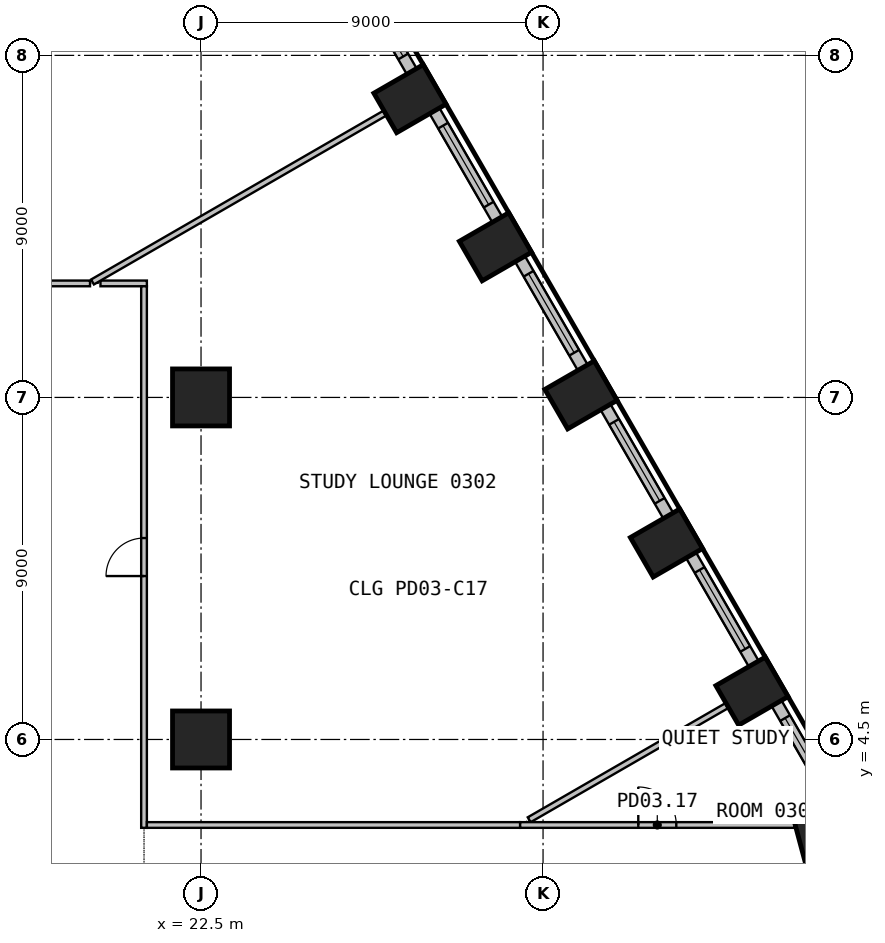
"""IFC4 building model, lengths in metres.
Left out: names, types, materials, properties, quantities, classifications, styles, units other than length and angle.
Written with IfcOpenShell. Run it as: python <this file> out.ifc"""

import sys

from ifc_helpers import new_model, si_unit, direction, frame, frame_2d, origin, origin_2d, place, context, subcontext, project, spatial, rectangle, circle, extrude, element, fill, save


model = new_model("IFC4")
c1 = context("Model", 3, precision=1e-05, world=origin(), true_north=direction((0.0, 1.0)))
c2 = subcontext(c1, "Body", "Model", "MODEL_VIEW")
j1 = project(units=[si_unit("LENGTHUNIT", "METRE"), si_unit("PLANEANGLEUNIT", "RADIAN")], contexts=[c1])
p1 = place(None, origin())
s1 = spatial("IfcSite", under=j1, at=p1, CompositionType="ELEMENT")
p2 = place(p1, origin())
s2 = spatial("IfcBuilding", under=s1, at=p2, CompositionType="ELEMENT")
p3 = place(p2, frame((0.0, 0.0, 15.6)))
s3 = spatial("IfcBuildingStorey", under=s2, at=p3, CompositionType="ELEMENT", Elevation=15.6)
p4 = place(p3, frame((38.979, 2.004, 0.0), z_axis=(0.0, 0.0, 1.0), x_axis=(-0.258819045103, 0.965925826289, 0.0)))
e1 = element("IfcColumn", 1, at=p4, inside=s3, PredefinedType="COLUMN", context=c2, shape_type="SweptSolid", body=[
    extrude(rectangle(XDim=1.5, YDim=1.5, at=origin_2d()), origin(), (0.0, 0.0, 1.0), 4.4),
])
for number, where, z_axis, x_axis in (
    (2, (36.998, 5.772, 0.0), (0.0, 0.0, 1.0), (-0.5, 0.866, 0.0)),
    (3, (34.748, 9.669, 0.0), (0.0, 0.0, 1.0), (-0.5, 0.866, 0.0)),
    (4, (32.498, 13.566, 0.0), (0.0, 0.0, 1.0), (-0.5, 0.866, 0.0)),
    (5, (30.248, 17.463, 0.0), (0.0, 0.0, 1.0), (-0.5, 0.866, 0.0)),
    (6, (27.998, 21.361, 0.0), (0.0, 0.0, 1.0), (-0.5, 0.866, 0.0)),
):
    element("IfcColumn", number, at=place(p3, frame(where, z_axis=z_axis, x_axis=x_axis)), inside=s3, PredefinedType="COLUMN", context=c2, shape_type="SweptSolid", body=[
        extrude(rectangle(XDim=1.2, YDim=1.5, at=origin_2d()), origin(), (0.0, 0.0, 1.0), 4.4),
    ])
for number, where, z_axis, x_axis in (
    (7, (22.5, 4.5, 0.0), (0.0, 0.0, 1.0), (1.0, 0.0, 0.0)),
    (8, (22.5, 13.5, 0.0), (0.0, 0.0, 1.0), (1.0, 0.0, 0.0)),
):
    element("IfcColumn", number, at=place(p3, frame(where, z_axis=z_axis, x_axis=x_axis)), inside=s3, PredefinedType="COLUMN", context=c2, shape_type="SweptSolid", body=[
        extrude(circle(Radius=0.75, at=origin_2d()), origin(), (0.0, 0.0, 1.0), 4.4),
    ])
p5 = place(p3, frame((39.139, 2.864, 0.0), z_axis=(0.0, 0.0, 1.0), x_axis=(-0.49999586137, 0.866027793211, 0.0)))
e9 = element("IfcWall", 9, at=p5, inside=s3, PredefinedType="SOLIDWALL", context=c2, shape_type="SweptSolid", body=[
    extrude(rectangle(XDim=2.989, YDim=0.3, at=frame_2d((1.494, 0.0))), origin(), (0.0, 0.0, 1.0), 4.4),
])
p6 = place(p5, frame((0.139, 0.0, 0.9)))
e10 = element("IfcOpeningElement", 10, at=p6, cuts=e9, PredefinedType="OPENING", context=c2, shape_type="SweptSolid", body=[
    extrude(rectangle(XDim=2.4, YDim=3.0, at=frame_2d((1.2, 1.5))), frame((0.0, 0.16, 0.0), z_axis=(0.0, -1.0, 0.0), x_axis=(1.0, 0.0, 0.0)), (0.0, 0.0, 1.0), 0.32),
])
p7 = place(p3, frame((37.044, 6.492, 0.0), z_axis=(0.0, 0.0, 1.0), x_axis=(-0.499991515992, 0.866030301974, 0.0)))
e11 = element("IfcWall", 11, at=p7, inside=s3, PredefinedType="SOLIDWALL", context=c2, shape_type="SweptSolid", body=[
    extrude(rectangle(XDim=3.299, YDim=0.3, at=frame_2d((1.649, 0.0))), origin(), (0.0, 0.0, 1.0), 4.4),
])
p8 = place(p7, frame((0.449, 0.0, 0.9)))
e12 = element("IfcOpeningElement", 12, at=p8, cuts=e11, PredefinedType="OPENING", context=c2, shape_type="SweptSolid", body=[
    extrude(rectangle(XDim=2.4, YDim=3.0, at=frame_2d((1.2, 1.5))), frame((0.0, 0.16, 0.0), z_axis=(0.0, -1.0, 0.0), x_axis=(1.0, 0.0, 0.0)), (0.0, 0.0, 1.0), 0.32),
])
p9 = place(p3, frame((34.794, 10.389, 0.0), z_axis=(0.0, 0.0, 1.0), x_axis=(-0.499991515992, 0.866030301974, 0.0)))
e13 = element("IfcWall", 13, at=p9, inside=s3, PredefinedType="SOLIDWALL", context=c2, shape_type="SweptSolid", body=[
    extrude(rectangle(XDim=3.299, YDim=0.3, at=frame_2d((1.649, 0.0))), origin(), (0.0, 0.0, 1.0), 4.4),
])
p10 = place(p9, frame((0.449, 0.0, 0.9)))
e14 = element("IfcOpeningElement", 14, at=p10, cuts=e13, PredefinedType="OPENING", context=c2, shape_type="SweptSolid", body=[
    extrude(rectangle(XDim=2.4, YDim=3.0, at=frame_2d((1.2, 1.5))), frame((0.0, 0.16, 0.0), z_axis=(0.0, -1.0, 0.0), x_axis=(1.0, 0.0, 0.0)), (0.0, 0.0, 1.0), 0.32),
])
p11 = place(p3, frame((32.544, 14.286, 0.0), z_axis=(0.0, 0.0, 1.0), x_axis=(-0.499991515992, 0.866030301974, 0.0)))
e15 = element("IfcWall", 15, at=p11, inside=s3, PredefinedType="SOLIDWALL", context=c2, shape_type="SweptSolid", body=[
    extrude(rectangle(XDim=3.299, YDim=0.3, at=frame_2d((1.649, 0.0))), origin(), (0.0, 0.0, 1.0), 4.4),
])
p12 = place(p11, frame((0.449, 0.0, 0.9)))
e16 = element("IfcOpeningElement", 16, at=p12, cuts=e15, PredefinedType="OPENING", context=c2, shape_type="SweptSolid", body=[
    extrude(rectangle(XDim=2.4, YDim=3.0, at=frame_2d((1.2, 1.5))), frame((0.0, 0.16, 0.0), z_axis=(0.0, -1.0, 0.0), x_axis=(1.0, 0.0, 0.0)), (0.0, 0.0, 1.0), 0.32),
])
p13 = place(p3, frame((30.294, 18.184, 0.0), z_axis=(0.0, 0.0, 1.0), x_axis=(-0.499991515992, 0.866030301974, 0.0)))
e17 = element("IfcWall", 17, at=p13, inside=s3, PredefinedType="SOLIDWALL", context=c2, shape_type="SweptSolid", body=[
    extrude(rectangle(XDim=3.299, YDim=0.3, at=frame_2d((1.649, 0.0))), origin(), (0.0, 0.0, 1.0), 4.4),
])
p14 = place(p13, frame((0.449, 0.0, 0.9)))
e18 = element("IfcOpeningElement", 18, at=p14, cuts=e17, PredefinedType="OPENING", context=c2, shape_type="SweptSolid", body=[
    extrude(rectangle(XDim=2.4, YDim=3.0, at=frame_2d((1.2, 1.5))), frame((0.0, 0.16, 0.0), z_axis=(0.0, -1.0, 0.0), x_axis=(1.0, 0.0, 0.0)), (0.0, 0.0, 1.0), 0.32),
])
p15 = place(p3, frame((28.044, 22.081, 0.0), z_axis=(0.0, 0.0, 1.0), x_axis=(-0.499991515992, 0.866030301974, 0.0)))
e19 = element("IfcWall", 19, at=p15, inside=s3, PredefinedType="SOLIDWALL", context=c2, shape_type="SweptSolid", body=[
    extrude(rectangle(XDim=3.299, YDim=0.3, at=frame_2d((1.649, 0.0))), origin(), (0.0, 0.0, 1.0), 4.4),
])
p16 = place(p15, frame((0.449, 0.0, 0.9)))
e20 = element("IfcOpeningElement", 20, at=p16, cuts=e19, PredefinedType="OPENING", context=c2, shape_type="SweptSolid", body=[
    extrude(rectangle(XDim=2.4, YDim=3.0, at=frame_2d((1.2, 1.5))), frame((0.0, 0.16, 0.0), z_axis=(0.0, -1.0, 0.0), x_axis=(1.0, 0.0, 0.0)), (0.0, 0.0, 1.0), 0.32),
])
p17 = place(p3, frame((19.579, 16.5, 0.0), z_axis=(0.0, 0.0, 1.0), x_axis=(-1.0, 0.0, 0.0)))
e21 = element("IfcWall", 21, at=p17, inside=s3, PredefinedType="PARTITIONING", context=c2, shape_type="SweptSolid", body=[
    extrude(rectangle(XDim=8.329, YDim=0.15, at=frame_2d((4.165, 0.0))), origin(), (0.0, 0.0, 1.0), 4.4),
])
p18 = place(p3, frame((21.075, 16.5, 0.0), z_axis=(0.0, 0.0, 1.0), x_axis=(-1.0, 0.0, 0.0)))
e22 = element("IfcWall", 22, at=p18, inside=s3, PredefinedType="PARTITIONING", context=c2, shape_type="SweptSolid", body=[
    extrude(rectangle(XDim=1.221, YDim=0.15, at=frame_2d((0.61, 0.0))), origin(), (0.0, 0.0, 1.0), 4.4),
])
p19 = place(p3, frame((27.331, 20.976, 0.0), z_axis=(0.0, 0.0, 1.0), x_axis=(-0.866000072607, -0.50004387232, 0.0)))
e23 = element("IfcWall", 23, at=p19, inside=s3, PredefinedType="PARTITIONING", context=c2, shape_type="SweptSolid", body=[
    extrude(rectangle(XDim=8.876, YDim=0.15, at=frame_2d((4.438, 0.0))), origin(), (0.0, 0.0, 1.0), 4.4),
])
p20 = place(p3, frame((21.0, 2.175, 0.0), z_axis=(0.0, 0.0, 1.0), x_axis=(0.0, 1.0, 0.0)))
e24 = element("IfcWall", 24, at=p20, inside=s3, PredefinedType="PARTITIONING", context=c2, shape_type="SweptSolid", body=[
    extrude(rectangle(XDim=14.25, YDim=0.15, at=frame_2d((7.125, 0.0))), origin(), (0.0, 0.0, 1.0), 4.4),
])
p21 = place(p20, frame((6.625, 0.0, 0.0)))
e25 = element("IfcOpeningElement", 25, at=p21, cuts=e24, PredefinedType="OPENING", context=c2, shape_type="SweptSolid", body=[
    extrude(rectangle(XDim=1.0, YDim=2.1, at=frame_2d((0.5, 1.05))), frame((0.0, 0.085, 0.0), z_axis=(0.0, -1.0, 0.0), x_axis=(1.0, 0.0, 0.0)), (0.0, 0.0, 1.0), 0.17),
])
p22 = place(p3, frame((21.075, 2.25, 0.0), z_axis=(0.0, 0.0, 1.0), x_axis=(1.0, 0.0, 0.0)))
e26 = element("IfcWall", 26, at=p22, inside=s3, PredefinedType="PARTITIONING", context=c2, shape_type="SweptSolid", body=[
    extrude(rectangle(XDim=9.822, YDim=0.15, at=frame_2d((4.911, 0.0))), origin(), (0.0, 0.0, 1.0), 4.4),
])
p23 = place(p3, frame((36.331, 5.387, 0.0), z_axis=(0.0, 0.0, 1.0), x_axis=(-0.866018198007, -0.500012480565, 0.0)))
e27 = element("IfcWall", 27, at=p23, inside=s3, PredefinedType="PARTITIONING", context=c2, shape_type="SweptSolid", body=[
    extrude(rectangle(XDim=5.999, YDim=0.15, at=frame_2d((3.0, 0.0))), origin(), (0.0, 0.0, 1.0), 4.4),
])
p24 = place(p3, frame((30.897, 2.25, 0.0), z_axis=(0.0, 0.0, 1.0), x_axis=(1.0, 0.0, 0.0)))
e28 = element("IfcWall", 28, at=p24, inside=s3, PredefinedType="PARTITIONING", context=c2, shape_type="SweptSolid", body=[
    extrude(rectangle(XDim=7.219, YDim=0.15, at=frame_2d((3.609, 0.0))), origin(), (0.0, 0.0, 1.0), 4.4),
])
p25 = place(p24, frame((3.109, 0.0, 0.0)))
e29 = element("IfcOpeningElement", 29, at=p25, cuts=e28, PredefinedType="OPENING", context=c2, shape_type="SweptSolid", body=[
    extrude(rectangle(XDim=1.0, YDim=2.1, at=frame_2d((0.5, 1.05))), frame((0.0, 0.085, 0.0), z_axis=(0.0, -1.0, 0.0), x_axis=(1.0, 0.0, 0.0)), (0.0, 0.0, 1.0), 0.17),
])
p26 = place(p6, origin())
e30 = element("IfcWindow", 30, at=p26, inside=s3, PartitioningType="SINGLE_PANEL", PredefinedType="WINDOW", context=c2, shape_type="SweptSolid", body=[
    extrude(rectangle(XDim=2.4, YDim=3.0, at=frame_2d((1.2, 1.5))), frame((0.0, 0.03, 0.0), z_axis=(0.0, -1.0, 0.0), x_axis=(1.0, 0.0, 0.0)), (0.0, 0.0, 1.0), 0.06),
])
fill(e10, e30)
p27 = place(p8, origin())
e31 = element("IfcWindow", 31, at=p27, inside=s3, PartitioningType="SINGLE_PANEL", PredefinedType="WINDOW", context=c2, shape_type="SweptSolid", body=[
    extrude(rectangle(XDim=2.4, YDim=3.0, at=frame_2d((1.2, 1.5))), frame((0.0, 0.03, 0.0), z_axis=(0.0, -1.0, 0.0), x_axis=(1.0, 0.0, 0.0)), (0.0, 0.0, 1.0), 0.06),
])
fill(e12, e31)
p28 = place(p10, origin())
e32 = element("IfcWindow", 32, at=p28, inside=s3, PartitioningType="SINGLE_PANEL", PredefinedType="WINDOW", context=c2, shape_type="SweptSolid", body=[
    extrude(rectangle(XDim=2.4, YDim=3.0, at=frame_2d((1.2, 1.5))), frame((0.0, 0.03, 0.0), z_axis=(0.0, -1.0, 0.0), x_axis=(1.0, 0.0, 0.0)), (0.0, 0.0, 1.0), 0.06),
])
fill(e14, e32)
p29 = place(p12, origin())
e33 = element("IfcWindow", 33, at=p29, inside=s3, PartitioningType="SINGLE_PANEL", PredefinedType="WINDOW", context=c2, shape_type="SweptSolid", body=[
    extrude(rectangle(XDim=2.4, YDim=3.0, at=frame_2d((1.2, 1.5))), frame((0.0, 0.03, 0.0), z_axis=(0.0, -1.0, 0.0), x_axis=(1.0, 0.0, 0.0)), (0.0, 0.0, 1.0), 0.06),
])
fill(e16, e33)
p30 = place(p14, origin())
e34 = element("IfcWindow", 34, at=p30, inside=s3, PartitioningType="SINGLE_PANEL", PredefinedType="WINDOW", context=c2, shape_type="SweptSolid", body=[
    extrude(rectangle(XDim=2.4, YDim=3.0, at=frame_2d((1.2, 1.5))), frame((0.0, 0.03, 0.0), z_axis=(0.0, -1.0, 0.0), x_axis=(1.0, 0.0, 0.0)), (0.0, 0.0, 1.0), 0.06),
])
fill(e18, e34)
p31 = place(p16, origin())
e35 = element("IfcWindow", 35, at=p31, inside=s3, PartitioningType="SINGLE_PANEL", PredefinedType="WINDOW", context=c2, shape_type="SweptSolid", body=[
    extrude(rectangle(XDim=2.4, YDim=3.0, at=frame_2d((1.2, 1.5))), frame((0.0, 0.03, 0.0), z_axis=(0.0, -1.0, 0.0), x_axis=(1.0, 0.0, 0.0)), (0.0, 0.0, 1.0), 0.06),
])
fill(e20, e35)
p32 = place(p21, origin())
e36 = element("IfcDoor", 36, at=p32, inside=s3, OperationType="SINGLE_SWING_LEFT", PredefinedType="DOOR", context=c2, shape_type="SweptSolid", body=[
    extrude(rectangle(XDim=1.0, YDim=2.1, at=frame_2d((0.5, 1.05))), frame((0.0, 0.025, 0.0), z_axis=(0.0, -1.0, 0.0), x_axis=(1.0, 0.0, 0.0)), (0.0, 0.0, 1.0), 0.05),
])
fill(e25, e36)
p33 = place(p25, origin())
e37 = element("IfcDoor", 37, at=p33, inside=s3, OperationType="SINGLE_SWING_LEFT", PredefinedType="DOOR", context=c2, shape_type="SweptSolid", body=[
    extrude(rectangle(XDim=1.0, YDim=2.1, at=frame_2d((0.5, 1.05))), frame((0.0, 0.025, 0.0), z_axis=(0.0, -1.0, 0.0), x_axis=(1.0, 0.0, 0.0)), (0.0, 0.0, 1.0), 0.05),
])
fill(e29, e37)
save(model, sys.argv[1])
